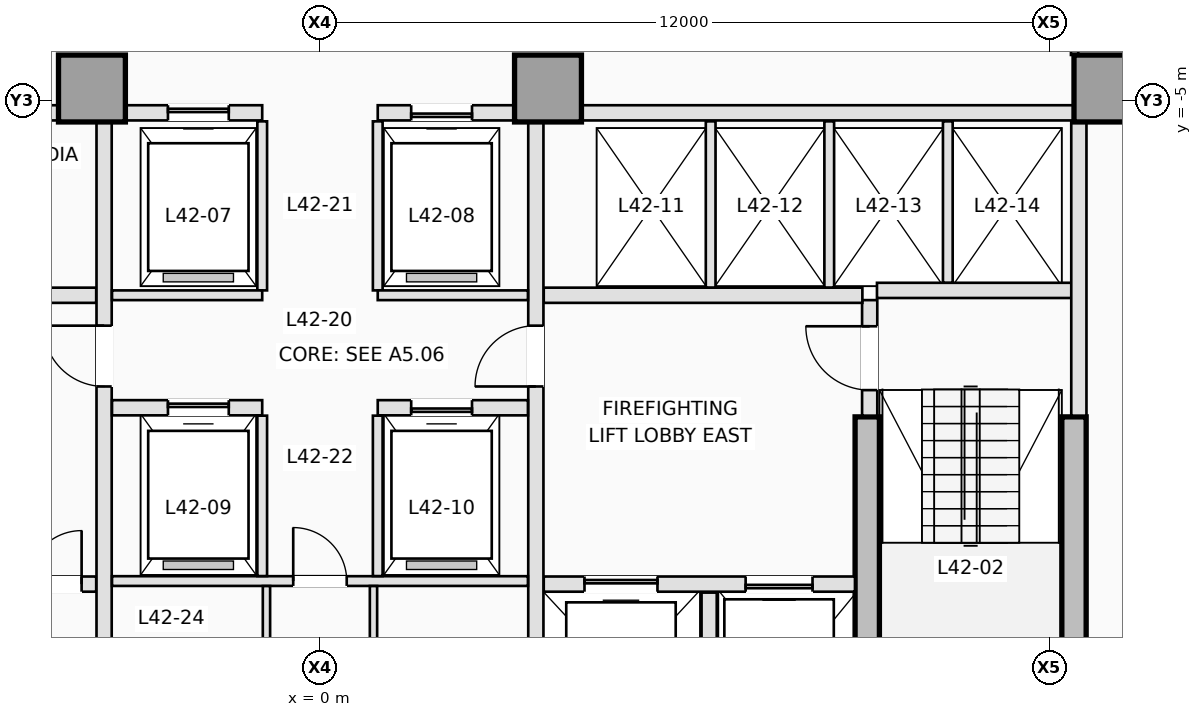
"""IFC4 building model, lengths in metres.
Left out: names, types, materials, properties, quantities, classifications, styles, units other than length and angle.
Written with IfcOpenShell. Run it as: python <this file> out.ifc"""

import sys

from ifc_helpers import new_model, si_unit, direction, frame, frame_2d, origin, origin_2d, place, context, subcontext, project, spatial, rectangle, extrude, element, fill, save


model = new_model("IFC4")
c1 = context("Model", 3, precision=1e-05, world=origin(), true_north=direction((0.0, 1.0)))
c2 = subcontext(c1, "Body", "Model", "MODEL_VIEW")
j1 = project(units=[si_unit("LENGTHUNIT", "METRE"), si_unit("PLANEANGLEUNIT", "RADIAN")], contexts=[c1])
p1 = place(None, origin())
s1 = spatial("IfcSite", under=j1, at=p1, CompositionType="ELEMENT")
p2 = place(p1, origin())
s2 = spatial("IfcBuilding", under=s1, at=p2, CompositionType="ELEMENT")
p3 = place(p2, frame((0.0, 0.0, 154.5)))
s3 = spatial("IfcBuildingStorey", under=s2, at=p3, CompositionType="ELEMENT", Elevation=154.5)
p4 = place(p3, frame((12.4, -15.7, 0.0), z_axis=(0.0, 0.0, 1.0), x_axis=(0.0, 1.0, 0.0)))
e1 = element("IfcWall", 1, at=p4, inside=s3, PredefinedType="SHEAR", context=c2, shape_type="SweptSolid", body=[
    extrude(rectangle(XDim=5.5, YDim=0.4, at=frame_2d((2.75, 0.0))), origin(), (0.0, 0.0, 1.0), 3.5),
])
p5 = place(p3, frame((9.0, -16.15, 0.0), z_axis=(0.0, 0.0, 1.0), x_axis=(0.0, 1.0, 0.0)))
e2 = element("IfcWall", 2, at=p5, inside=s3, PredefinedType="SHEAR", context=c2, shape_type="SweptSolid", body=[
    extrude(rectangle(XDim=5.95, YDim=0.4, at=frame_2d((2.975, 0.0))), origin(), (0.0, 0.0, 1.0), 3.5),
])
for number, where, z_axis, x_axis in (
    (3, (-3.75, -4.8, 0.0), (0.0, 0.0, 1.0), (1.0, 0.0, 0.0)),
    (4, (3.75, -4.8, 0.0), (0.0, 0.0, 1.0), (1.0, 0.0, 0.0)),
    (5, (12.95, -4.8, 0.0), (0.0, 0.0, 1.0), (1.0, 0.0, 0.0)),
):
    element("IfcColumn", number, at=place(p3, frame(where, z_axis=z_axis, x_axis=x_axis)), inside=s3, PredefinedType="COLUMN", context=c2, shape_type="SweptSolid", body=[
        extrude(rectangle(XDim=1.1, YDim=1.1, at=origin_2d()), origin(), (0.0, 0.0, 1.0), 3.5),
    ])
p6 = place(p3, frame((9.04, -10.18, 0.0), z_axis=(0.0, 0.0, 1.0), x_axis=(0.0, 1.0, 0.0)))
e6 = element("IfcWall", 6, at=p6, inside=s3, PredefinedType="PARTITIONING", context=c2, shape_type="SweptSolid", body=[
    extrude(rectangle(XDim=1.9, YDim=0.25, at=frame_2d((0.95, 0.0))), origin(), (0.0, 0.0, 1.0), 3.25),
])
p7 = place(p6, frame((0.42, 0.0, 0.0)))
e7 = element("IfcOpeningElement", 7, at=p7, cuts=e6, PredefinedType="OPENING", context=c2, shape_type="SweptSolid", body=[
    extrude(rectangle(XDim=1.05, YDim=2.15, at=frame_2d((0.525, 1.075))), frame((0.0, 0.135, 0.0), z_axis=(0.0, -1.0, 0.0), x_axis=(1.0, 0.0, 0.0)), (0.0, 0.0, 1.0), 0.27),
])
p8 = place(p3, frame((9.16, -8.12, 0.0), z_axis=(0.0, 0.0, 1.0), x_axis=(1.0, 0.0, 0.0)))
e8 = element("IfcWall", 8, at=p8, inside=s3, PredefinedType="PARTITIONING", context=c2, shape_type="SweptSolid", body=[
    extrude(rectangle(XDim=3.22, YDim=0.25, at=frame_2d((1.61, 0.0))), origin(), (0.0, 0.0, 1.0), 3.25),
])
p9 = place(p3, frame((12.48, -10.18, 0.0), z_axis=(0.0, 0.0, 1.0), x_axis=(0.0, 1.0, 0.0)))
e9 = element("IfcWall", 9, at=p9, inside=s3, PredefinedType="PARTITIONING", context=c2, shape_type="SweptSolid", body=[
    extrude(rectangle(XDim=4.828, YDim=0.25, at=frame_2d((2.414, 0.0))), origin(), (0.0, 0.0, 1.0), 3.25),
])
p10 = place(p3, frame((-8.798, -12.95, 0.0), z_axis=(0.0, 0.0, 1.0), x_axis=(1.0, 0.0, 0.0)))
e10 = element("IfcWall", 10, at=p10, inside=s3, PredefinedType="PARTITIONING", context=c2, shape_type="SweptSolid", body=[
    extrude(rectangle(XDim=5.118, YDim=0.25, at=frame_2d((2.559, 0.0))), origin(), (0.0, 0.0, 1.0), 3.25),
])
p11 = place(p10, frame((0.698, 0.0, 0.0)))
e11 = element("IfcOpeningElement", 11, at=p11, cuts=e10, PredefinedType="OPENING", context=c2, shape_type="SweptSolid", body=[
    extrude(rectangle(XDim=1.1, YDim=2.15, at=frame_2d((0.55, 1.075))), frame((0.0, 0.135, 0.0), z_axis=(0.0, -1.0, 0.0), x_axis=(1.0, 0.0, 0.0)), (0.0, 0.0, 1.0), 0.27),
])
p12 = place(p10, frame((2.598, 0.0, 0.0)))
e12 = element("IfcOpeningElement", 12, at=p12, cuts=e10, PredefinedType="OPENING", context=c2, shape_type="SweptSolid", body=[
    extrude(rectangle(XDim=0.88, YDim=2.1, at=frame_2d((0.44, 1.05))), frame((0.0, 0.135, 0.0), z_axis=(0.0, -1.0, 0.0), x_axis=(1.0, 0.0, 0.0)), (0.0, 0.0, 1.0), 0.27),
])
p13 = place(p10, frame((3.998, 0.0, 0.0)))
e13 = element("IfcOpeningElement", 13, at=p13, cuts=e10, PredefinedType="OPENING", context=c2, shape_type="SweptSolid", body=[
    extrude(rectangle(XDim=0.88, YDim=2.1, at=frame_2d((0.44, 1.05))), frame((0.0, 0.135, 0.0), z_axis=(0.0, -1.0, 0.0), x_axis=(1.0, 0.0, 0.0)), (0.0, 0.0, 1.0), 0.27),
])
p14 = place(p3, frame((3.68, -12.95, 0.0), z_axis=(0.0, 0.0, 1.0), x_axis=(1.0, 0.0, 0.0)))
e14 = element("IfcWall", 14, at=p14, inside=s3, PredefinedType="PARTITIONING", context=c2, shape_type="SweptSolid", body=[
    extrude(rectangle(XDim=5.118, YDim=0.25, at=frame_2d((2.559, 0.0))), origin(), (0.0, 0.0, 1.0), 3.25),
])
p15 = place(p14, frame((3.32, 0.0, 0.0)))
e15 = element("IfcOpeningElement", 15, at=p15, cuts=e14, PredefinedType="OPENING", context=c2, shape_type="SweptSolid", body=[
    extrude(rectangle(XDim=1.1, YDim=2.15, at=frame_2d((0.55, 1.075))), frame((0.0, 0.135, 0.0), z_axis=(0.0, -1.0, 0.0), x_axis=(1.0, 0.0, 0.0)), (0.0, 0.0, 1.0), 0.27),
])
p16 = place(p14, frame((0.67, 0.0, 0.0)))
e16 = element("IfcOpeningElement", 16, at=p16, cuts=e14, PredefinedType="OPENING", context=c2, shape_type="SweptSolid", body=[
    extrude(rectangle(XDim=1.2, YDim=2.15, at=frame_2d((0.6, 1.075))), frame((0.0, 0.135, 0.0), z_axis=(0.0, -1.0, 0.0), x_axis=(1.0, 0.0, 0.0)), (0.0, 0.0, 1.0), 0.27),
])
p17 = place(p3, frame((6.4, -15.92, 0.0), z_axis=(0.0, 0.0, 1.0), x_axis=(0.0, 1.0, 0.0)))
e17 = element("IfcWall", 17, at=p17, inside=s3, PredefinedType="PARTITIONING", context=c2, shape_type="SweptSolid", body=[
    extrude(rectangle(XDim=2.83, YDim=0.25, at=frame_2d((1.415, 0.0))), origin(), (0.0, 0.0, 1.0), 3.25),
])
for number, where, z_axis, x_axis in (
    (18, (-8.92, -8.2, 0.0), (0.0, 0.0, 1.0), (1.0, 0.0, 0.0)),
    (19, (3.68, -8.2, 0.0), (0.0, 0.0, 1.0), (1.0, 0.0, 0.0)),
):
    element("IfcWall", number, at=place(p3, frame(where, z_axis=z_axis, x_axis=x_axis)), inside=s3, PredefinedType="PARTITIONING", context=c2, shape_type="SweptSolid", body=[
        extrude(rectangle(XDim=5.24, YDim=0.25, at=frame_2d((2.62, 0.0))), origin(), (0.0, 0.0, 1.0), 3.25),
    ])
p18 = place(p3, frame((-3.55, -15.798, 0.0), z_axis=(0.0, 0.0, 1.0), x_axis=(0.0, 1.0, 0.0)))
e20 = element("IfcWall", 20, at=p18, inside=s3, PredefinedType="PARTITIONING", context=c2, shape_type="SweptSolid", body=[
    extrude(rectangle(XDim=10.446, YDim=0.25, at=frame_2d((5.223, 0.0))), origin(), (0.0, 0.0, 1.0), 3.25),
])
p19 = place(p18, frame((6.098, 0.0, 0.0)))
e21 = element("IfcOpeningElement", 21, at=p19, cuts=e20, PredefinedType="OPENING", context=c2, shape_type="SweptSolid", body=[
    extrude(rectangle(XDim=1.0, YDim=2.15, at=frame_2d((0.5, 1.075))), frame((0.0, 0.135, 0.0), z_axis=(0.0, -1.0, 0.0), x_axis=(1.0, 0.0, 0.0)), (0.0, 0.0, 1.0), 0.27),
])
p20 = place(p3, frame((3.55, -15.798, 0.0), z_axis=(0.0, 0.0, 1.0), x_axis=(0.0, 1.0, 0.0)))
e22 = element("IfcWall", 22, at=p20, inside=s3, PredefinedType="PARTITIONING", context=c2, shape_type="SweptSolid", body=[
    extrude(rectangle(XDim=10.446, YDim=0.25, at=frame_2d((5.223, 0.0))), origin(), (0.0, 0.0, 1.0), 3.25),
])
p21 = place(p20, frame((6.098, 0.0, 0.0)))
e23 = element("IfcOpeningElement", 23, at=p21, cuts=e22, PredefinedType="OPENING", context=c2, shape_type="SweptSolid", body=[
    extrude(rectangle(XDim=1.0, YDim=2.15, at=frame_2d((0.5, 1.075))), frame((0.0, 0.135, 0.0), z_axis=(0.0, -1.0, 0.0), x_axis=(1.0, 0.0, 0.0)), (0.0, 0.0, 1.0), 0.27),
])
p22 = place(p3, frame((-12.398, -5.2, 0.0), z_axis=(0.0, 0.0, 1.0), x_axis=(1.0, 0.0, 0.0)))
e24 = element("IfcWall", 24, at=p22, inside=s3, PredefinedType="PARTITIONING", context=c2, shape_type="SweptSolid", body=[
    extrude(rectangle(XDim=8.096, YDim=0.25, at=frame_2d((4.048, 0.0))), origin(), (0.0, 0.0, 1.0), 3.25),
])
p23 = place(p22, frame((2.968, 0.0, 0.0)))
e25 = element("IfcOpeningElement", 25, at=p23, cuts=e24, PredefinedType="OPENING", context=c2, shape_type="SweptSolid", body=[
    extrude(rectangle(XDim=0.92, YDim=2.12, at=frame_2d((0.46, 1.06))), frame((0.0, 0.135, 0.0), z_axis=(0.0, -1.0, 0.0), x_axis=(1.0, 0.0, 0.0)), (0.0, 0.0, 1.0), 0.27),
])
p24 = place(p22, frame((6.068, 0.0, 0.0)))
e26 = element("IfcOpeningElement", 26, at=p24, cuts=e24, PredefinedType="OPENING", context=c2, shape_type="SweptSolid", body=[
    extrude(rectangle(XDim=0.92, YDim=2.12, at=frame_2d((0.46, 1.06))), frame((0.0, 0.135, 0.0), z_axis=(0.0, -1.0, 0.0), x_axis=(1.0, 0.0, 0.0)), (0.0, 0.0, 1.0), 0.27),
])
p25 = place(p3, frame((4.302, -5.2, 0.0), z_axis=(0.0, 0.0, 1.0), x_axis=(1.0, 0.0, 0.0)))
e27 = element("IfcWall", 27, at=p25, inside=s3, PredefinedType="PARTITIONING", context=c2, shape_type="SweptSolid", body=[
    extrude(rectangle(XDim=8.096, YDim=0.25, at=frame_2d((4.048, 0.0))), origin(), (0.0, 0.0, 1.0), 3.25),
])
p26 = place(p3, frame((-3.198, -5.2, 0.0), z_axis=(0.0, 0.0, 1.0), x_axis=(1.0, 0.0, 0.0)))
e28 = element("IfcWall", 28, at=p26, inside=s3, PredefinedType="PARTITIONING", context=c2, shape_type="SweptSolid", body=[
    extrude(rectangle(XDim=2.248, YDim=0.25, at=frame_2d((1.124, 0.0))), origin(), (0.0, 0.0, 1.0), 3.25),
])
p27 = place(p26, frame((0.698, 0.0, 0.0)))
e29 = element("IfcOpeningElement", 29, at=p27, cuts=e28, PredefinedType="OPENING", context=c2, shape_type="SweptSolid", body=[
    extrude(rectangle(XDim=1.0, YDim=2.15, at=frame_2d((0.5, 1.075))), frame((0.0, 0.135, 0.0), z_axis=(0.0, -1.0, 0.0), x_axis=(1.0, 0.0, 0.0)), (0.0, 0.0, 1.0), 0.27),
])
p28 = place(p3, frame((0.95, -5.2, 0.0), z_axis=(0.0, 0.0, 1.0), x_axis=(1.0, 0.0, 0.0)))
e30 = element("IfcWall", 30, at=p28, inside=s3, PredefinedType="PARTITIONING", context=c2, shape_type="SweptSolid", body=[
    extrude(rectangle(XDim=2.248, YDim=0.25, at=frame_2d((1.124, 0.0))), origin(), (0.0, 0.0, 1.0), 3.25),
])
p29 = place(p28, frame((0.55, 0.0, 0.0)))
e31 = element("IfcOpeningElement", 31, at=p29, cuts=e30, PredefinedType="OPENING", context=c2, shape_type="SweptSolid", body=[
    extrude(rectangle(XDim=1.0, YDim=2.15, at=frame_2d((0.5, 1.075))), frame((0.0, 0.135, 0.0), z_axis=(0.0, -1.0, 0.0), x_axis=(1.0, 0.0, 0.0)), (0.0, 0.0, 1.0), 0.27),
])
for number, where, z_axis, x_axis in (
    (32, (6.425, -8.073, 0.0), (0.0, 0.0, 1.0), (0.0, 1.0, 0.0)),
    (33, (8.375, -8.073, 0.0), (0.0, 0.0, 1.0), (0.0, 1.0, 0.0)),
):
    element("IfcWall", number, at=place(p3, frame(where, z_axis=z_axis, x_axis=x_axis)), inside=s3, PredefinedType="PARTITIONING", context=c2, shape_type="SweptSolid", body=[
        extrude(rectangle(XDim=2.733, YDim=0.16, at=frame_2d((1.366, 0.0))), origin(), (0.0, 0.0, 1.0), 3.25),
    ])
p30 = place(p3, frame((10.325, -7.993, 0.0), z_axis=(0.0, 0.0, 1.0), x_axis=(0.0, 1.0, 0.0)))
e34 = element("IfcWall", 34, at=p30, inside=s3, PredefinedType="PARTITIONING", context=c2, shape_type="SweptSolid", body=[
    extrude(rectangle(XDim=2.653, YDim=0.16, at=frame_2d((1.326, 0.0))), origin(), (0.0, 0.0, 1.0), 3.25),
])
for number, where, z_axis, x_axis in (
    (35, (-0.95, -8.12, 0.0), (0.0, 0.0, 1.0), (0.0, 1.0, 0.0)),
    (36, (0.95, -8.12, 0.0), (0.0, 0.0, 1.0), (0.0, 1.0, 0.0)),
):
    element("IfcWall", number, at=place(p3, frame(where, z_axis=z_axis, x_axis=x_axis)), inside=s3, PredefinedType="PARTITIONING", context=c2, shape_type="SweptSolid", body=[
        extrude(rectangle(XDim=2.78, YDim=0.16, at=frame_2d((1.39, 0.0))), origin(), (0.0, 0.0, 1.0), 3.25),
    ])
for number, where, z_axis, x_axis in (
    (37, (-3.42, -8.2, 0.0), (0.0, 0.0, 1.0), (1.0, 0.0, 0.0)),
    (38, (0.95, -8.2, 0.0), (0.0, 0.0, 1.0), (1.0, 0.0, 0.0)),
):
    element("IfcWall", number, at=place(p3, frame(where, z_axis=z_axis, x_axis=x_axis)), inside=s3, PredefinedType="PARTITIONING", context=c2, shape_type="SweptSolid", body=[
        extrude(rectangle(XDim=2.47, YDim=0.16, at=frame_2d((1.235, 0.0))), origin(), (0.0, 0.0, 1.0), 3.25),
    ])
p31 = place(p3, frame((-3.42, -10.05, 0.0), z_axis=(0.0, 0.0, 1.0), x_axis=(1.0, 0.0, 0.0)))
e39 = element("IfcWall", 39, at=p31, inside=s3, PredefinedType="PARTITIONING", context=c2, shape_type="SweptSolid", body=[
    extrude(rectangle(XDim=2.47, YDim=0.25, at=frame_2d((1.235, 0.0))), origin(), (0.0, 0.0, 1.0), 3.25),
])
p32 = place(p31, frame((0.92, 0.0, 0.0)))
e40 = element("IfcOpeningElement", 40, at=p32, cuts=e39, PredefinedType="OPENING", context=c2, shape_type="SweptSolid", body=[
    extrude(rectangle(XDim=1.0, YDim=2.15, at=frame_2d((0.5, 1.075))), frame((0.0, 0.135, 0.0), z_axis=(0.0, -1.0, 0.0), x_axis=(1.0, 0.0, 0.0)), (0.0, 0.0, 1.0), 0.27),
])
p33 = place(p3, frame((0.95, -10.05, 0.0), z_axis=(0.0, 0.0, 1.0), x_axis=(1.0, 0.0, 0.0)))
e41 = element("IfcWall", 41, at=p33, inside=s3, PredefinedType="PARTITIONING", context=c2, shape_type="SweptSolid", body=[
    extrude(rectangle(XDim=2.47, YDim=0.25, at=frame_2d((1.235, 0.0))), origin(), (0.0, 0.0, 1.0), 3.25),
])
p34 = place(p33, frame((0.55, 0.0, 0.0)))
e42 = element("IfcOpeningElement", 42, at=p34, cuts=e41, PredefinedType="OPENING", context=c2, shape_type="SweptSolid", body=[
    extrude(rectangle(XDim=1.0, YDim=2.15, at=frame_2d((0.5, 1.075))), frame((0.0, 0.135, 0.0), z_axis=(0.0, -1.0, 0.0), x_axis=(1.0, 0.0, 0.0)), (0.0, 0.0, 1.0), 0.27),
])
p35 = place(p3, frame((-3.42, -12.9, 0.0), z_axis=(0.0, 0.0, 1.0), x_axis=(1.0, 0.0, 0.0)))
e43 = element("IfcWall", 43, at=p35, inside=s3, PredefinedType="PARTITIONING", context=c2, shape_type="SweptSolid", body=[
    extrude(rectangle(XDim=6.84, YDim=0.16, at=frame_2d((3.42, 0.0))), origin(), (0.0, 0.0, 1.0), 3.25),
])
p36 = place(p35, frame((2.98, 0.0, 0.0)))
e44 = element("IfcOpeningElement", 44, at=p36, cuts=e43, PredefinedType="OPENING", context=c2, shape_type="SweptSolid", body=[
    extrude(rectangle(XDim=0.88, YDim=2.12, at=frame_2d((0.44, 1.06))), frame((0.0, 0.09, 0.0), z_axis=(0.0, -1.0, 0.0), x_axis=(1.0, 0.0, 0.0)), (0.0, 0.0, 1.0), 0.18),
])
for number, where, z_axis, x_axis in (
    (45, (-0.95, -12.818, 0.0), (0.0, 0.0, 1.0), (0.0, 1.0, 0.0)),
    (46, (0.95, -12.818, 0.0), (0.0, 0.0, 1.0), (0.0, 1.0, 0.0)),
):
    element("IfcWall", number, at=place(p3, frame(where, z_axis=z_axis, x_axis=x_axis)), inside=s3, PredefinedType="PARTITIONING", context=c2, shape_type="SweptSolid", body=[
        extrude(rectangle(XDim=2.638, YDim=0.16, at=frame_2d((1.319, 0.0))), origin(), (0.0, 0.0, 1.0), 3.25),
    ])
p37 = place(p3, frame((-0.88, -16.02, 0.0), z_axis=(0.0, 0.0, 1.0), x_axis=(0.0, 1.0, 0.0)))
e47 = element("IfcWall", 47, at=p37, inside=s3, PredefinedType="PARTITIONING", context=c2, shape_type="SweptSolid", body=[
    extrude(rectangle(XDim=3.038, YDim=0.12, at=frame_2d((1.519, 0.0))), origin(), (0.0, 0.0, 1.0), 3.25),
])
p38 = place(p37, frame((1.05, 0.0, 0.0)))
e48 = element("IfcOpeningElement", 48, at=p38, cuts=e47, PredefinedType="OPENING", context=c2, shape_type="SweptSolid", body=[
    extrude(rectangle(XDim=0.88, YDim=2.12, at=frame_2d((0.44, 1.06))), frame((0.0, 0.07, 0.0), z_axis=(0.0, -1.0, 0.0), x_axis=(1.0, 0.0, 0.0)), (0.0, 0.0, 1.0), 0.14),
])
p39 = place(p3, frame((0.88, -16.02, 0.0), z_axis=(0.0, 0.0, 1.0), x_axis=(0.0, 1.0, 0.0)))
e49 = element("IfcWall", 49, at=p39, inside=s3, PredefinedType="PARTITIONING", context=c2, shape_type="SweptSolid", body=[
    extrude(rectangle(XDim=3.038, YDim=0.12, at=frame_2d((1.519, 0.0))), origin(), (0.0, 0.0, 1.0), 3.25),
])
p40 = place(p39, frame((1.05, 0.0, 0.0)))
e50 = element("IfcOpeningElement", 50, at=p40, cuts=e49, PredefinedType="OPENING", context=c2, shape_type="SweptSolid", body=[
    extrude(rectangle(XDim=0.88, YDim=2.12, at=frame_2d((0.44, 1.06))), frame((0.0, 0.07, 0.0), z_axis=(0.0, -1.0, 0.0), x_axis=(1.0, 0.0, 0.0)), (0.0, 0.0, 1.0), 0.14),
])
p41 = place(p3, frame((12.41, -2.462, 0.0), z_axis=(0.0, 0.0, 1.0), x_axis=(0.0, -1.0, 0.0)))
e51 = element("IfcWall", 51, at=p41, inside=s3, PredefinedType="PARTITIONING", context=c2, shape_type="SweptSolid", body=[
    extrude(rectangle(XDim=1.786, YDim=0.12, at=frame_2d((0.893, 0.0))), origin(), (0.0, 0.0, 1.0), 3.25),
])
p42 = place(p41, frame((0.623, 0.0, 0.0)))
e52 = element("IfcOpeningElement", 52, at=p42, cuts=e51, PredefinedType="OPENING", context=c2, shape_type="SweptSolid", body=[
    extrude(rectangle(XDim=0.92, YDim=2.12, at=frame_2d((0.46, 1.06))), frame((0.0, 0.07, 0.0), z_axis=(0.0, -1.0, 0.0), x_axis=(1.0, 0.0, 0.0)), (0.0, 0.0, 1.0), 0.14),
])
p43 = place(p27, origin())
e53 = element("IfcDoor", 53, at=p43, inside=s3, OperationType="SLIDING_TO_LEFT", PredefinedType="DOOR", context=c2, shape_type="SweptSolid", body=[
    extrude(rectangle(XDim=1.0, YDim=2.15, at=frame_2d((0.5, 1.075))), frame((0.0, 0.025, 0.0), z_axis=(0.0, -1.0, 0.0), x_axis=(1.0, 0.0, 0.0)), (0.0, 0.0, 1.0), 0.05),
])
fill(e29, e53)
p44 = place(p29, origin())
e54 = element("IfcDoor", 54, at=p44, inside=s3, OperationType="SLIDING_TO_RIGHT", PredefinedType="DOOR", context=c2, shape_type="SweptSolid", body=[
    extrude(rectangle(XDim=1.0, YDim=2.15, at=frame_2d((0.5, 1.075))), frame((0.0, 0.025, 0.0), z_axis=(0.0, -1.0, 0.0), x_axis=(1.0, 0.0, 0.0)), (0.0, 0.0, 1.0), 0.05),
])
fill(e31, e54)
p45 = place(p15, origin())
e55 = element("IfcDoor", 55, at=p45, inside=s3, OperationType="SLIDING_TO_RIGHT", PredefinedType="DOOR", context=c2, shape_type="SweptSolid", body=[
    extrude(rectangle(XDim=1.1, YDim=2.15, at=frame_2d((0.55, 1.075))), frame((0.0, 0.025, 0.0), z_axis=(0.0, -1.0, 0.0), x_axis=(1.0, 0.0, 0.0)), (0.0, 0.0, 1.0), 0.05),
])
fill(e15, e55)
p46 = place(p16, origin())
e56 = element("IfcDoor", 56, at=p46, inside=s3, OperationType="SLIDING_TO_LEFT", PredefinedType="DOOR", context=c2, shape_type="SweptSolid", body=[
    extrude(rectangle(XDim=1.2, YDim=2.15, at=frame_2d((0.6, 1.075))), frame((0.0, 0.025, 0.0), z_axis=(0.0, -1.0, 0.0), x_axis=(1.0, 0.0, 0.0)), (0.0, 0.0, 1.0), 0.05),
])
fill(e16, e56)
p47 = place(p32, origin())
e57 = element("IfcDoor", 57, at=p47, inside=s3, OperationType="SLIDING_TO_LEFT", PredefinedType="DOOR", context=c2, shape_type="SweptSolid", body=[
    extrude(rectangle(XDim=1.0, YDim=2.15, at=frame_2d((0.5, 1.075))), frame((0.0, 0.025, 0.0), z_axis=(0.0, -1.0, 0.0), x_axis=(1.0, 0.0, 0.0)), (0.0, 0.0, 1.0), 0.05),
])
fill(e40, e57)
p48 = place(p34, origin())
e58 = element("IfcDoor", 58, at=p48, inside=s3, OperationType="SLIDING_TO_RIGHT", PredefinedType="DOOR", context=c2, shape_type="SweptSolid", body=[
    extrude(rectangle(XDim=1.0, YDim=2.15, at=frame_2d((0.5, 1.075))), frame((0.0, 0.025, 0.0), z_axis=(0.0, -1.0, 0.0), x_axis=(1.0, 0.0, 0.0)), (0.0, 0.0, 1.0), 0.05),
])
fill(e42, e58)
p49 = place(p7, origin())
e59 = element("IfcDoor", 59, at=p49, inside=s3, OperationType="SINGLE_SWING_RIGHT", PredefinedType="DOOR", context=c2, shape_type="SweptSolid", body=[
    extrude(rectangle(XDim=1.05, YDim=2.15, at=frame_2d((0.525, 1.075))), frame((0.0, 0.025, 0.0), z_axis=(0.0, -1.0, 0.0), x_axis=(1.0, 0.0, 0.0)), (0.0, 0.0, 1.0), 0.05),
])
fill(e7, e59)
p50 = place(p13, origin())
e60 = element("IfcDoor", 60, at=p50, inside=s3, OperationType="SINGLE_SWING_RIGHT", PredefinedType="TRAPDOOR", context=c2, shape_type="SweptSolid", body=[
    extrude(rectangle(XDim=0.88, YDim=2.1, at=frame_2d((0.44, 1.05))), frame((0.0, 0.025, 0.0), z_axis=(0.0, -1.0, 0.0), x_axis=(1.0, 0.0, 0.0)), (0.0, 0.0, 1.0), 0.05),
])
fill(e13, e60)
p51 = place(p19, origin())
e61 = element("IfcDoor", 61, at=p51, inside=s3, OperationType="SINGLE_SWING_RIGHT", PredefinedType="DOOR", context=c2, shape_type="SweptSolid", body=[
    extrude(rectangle(XDim=1.0, YDim=2.15, at=frame_2d((0.5, 1.075))), frame((0.0, 0.025, 0.0), z_axis=(0.0, -1.0, 0.0), x_axis=(1.0, 0.0, 0.0)), (0.0, 0.0, 1.0), 0.05),
])
fill(e21, e61)
p52 = place(p21, origin())
e62 = element("IfcDoor", 62, at=p52, inside=s3, OperationType="SINGLE_SWING_LEFT", PredefinedType="DOOR", context=c2, shape_type="SweptSolid", body=[
    extrude(rectangle(XDim=1.0, YDim=2.15, at=frame_2d((0.5, 1.075))), frame((0.0, 0.025, 0.0), z_axis=(0.0, -1.0, 0.0), x_axis=(1.0, 0.0, 0.0)), (0.0, 0.0, 1.0), 0.05),
])
fill(e23, e62)
p53 = place(p36, origin())
e63 = element("IfcDoor", 63, at=p53, inside=s3, OperationType="SINGLE_SWING_LEFT", PredefinedType="DOOR", context=c2, shape_type="SweptSolid", body=[
    extrude(rectangle(XDim=0.88, YDim=2.12, at=frame_2d((0.44, 1.06))), frame((0.0, 0.025, 0.0), z_axis=(0.0, -1.0, 0.0), x_axis=(1.0, 0.0, 0.0)), (0.0, 0.0, 1.0), 0.05),
])
fill(e44, e63)
save(model, sys.argv[1])
